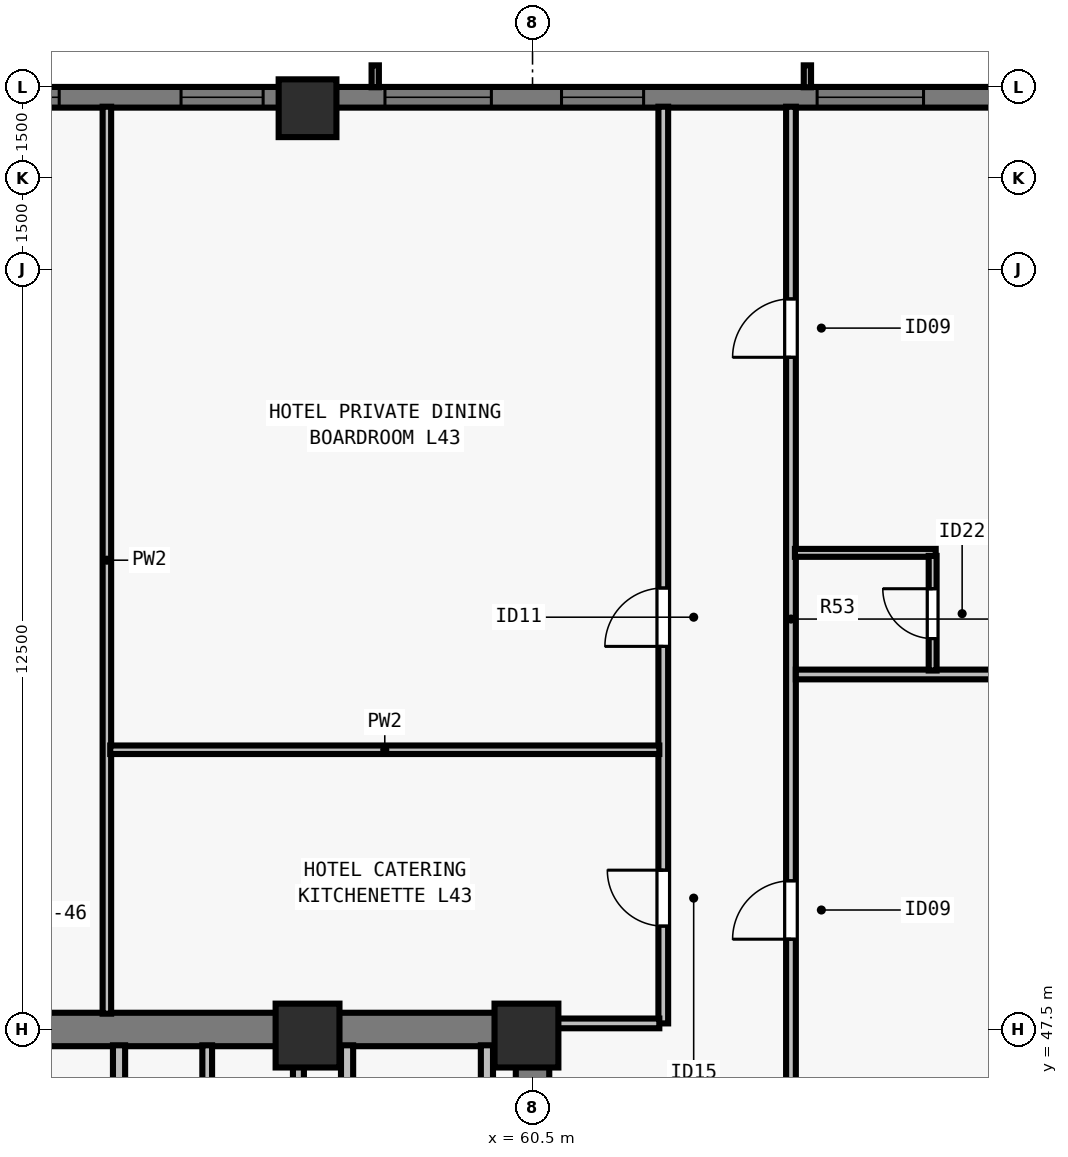
"""IFC4 building model, lengths in metres.
Left out: names, types, materials, properties, quantities, classifications, styles, units other than length and angle.
Written with IfcOpenShell. Run it as: python <this file> out.ifc"""

import sys

from ifc_helpers import new_model, si_unit, direction, frame, frame_2d, origin, origin_2d, place, context, subcontext, project, spatial, rectangle, extrude, element, fill, save


model = new_model("IFC4")
c1 = context("Model", 3, precision=1e-05, world=origin(), true_north=direction((0.0, 1.0)))
c2 = subcontext(c1, "Body", "Model", "MODEL_VIEW")
j1 = project(units=[si_unit("LENGTHUNIT", "METRE"), si_unit("PLANEANGLEUNIT", "RADIAN")], contexts=[c1])
p1 = place(None, origin())
s1 = spatial("IfcSite", under=j1, at=p1, CompositionType="ELEMENT")
p2 = place(p1, origin())
s2 = spatial("IfcBuilding", under=s1, at=p2, CompositionType="ELEMENT")
p3 = place(p2, frame((0.0, 0.0, 158.5)))
s3 = spatial("IfcBuildingStorey", under=s2, at=p3, CompositionType="ELEMENT", Elevation=158.5)
for number, where, z_axis, x_axis in (
    (1, (56.8, 47.4, 0.0), (0.0, 0.0, 1.0), (1.0, 0.0, 0.0)),
    (2, (60.4, 47.4, 0.0), (0.0, 0.0, 1.0), (1.0, 0.0, 0.0)),
):
    element("IfcColumn", number, at=place(p3, frame(where, z_axis=z_axis, x_axis=x_axis)), inside=s3, PredefinedType="COLUMN", context=c2, shape_type="SweptSolid", body=[
        extrude(rectangle(XDim=1.05, YDim=1.05, at=origin_2d()), origin(), (0.0, 0.0, 1.0), 3.5),
    ])
p4 = place(p3, frame((56.8, 62.65, 0.0), z_axis=(0.0, 0.0, 1.0), x_axis=(1.0, 0.0, 0.0)))
e3 = element("IfcColumn", 3, at=p4, inside=s3, PredefinedType="COLUMN", context=c2, shape_type="SweptSolid", body=[
    extrude(rectangle(XDim=0.95, YDim=0.95, at=origin_2d()), origin(), (0.0, 0.0, 1.0), 3.5),
])
p5 = place(p3, frame((32.0, 62.83, 0.0), z_axis=(0.0, 0.0, 1.0), x_axis=(1.0, 0.0, 0.0)))
e4 = element("IfcWall", 4, at=p5, inside=s3, PredefinedType="SOLIDWALL", context=c2, shape_type="SweptSolid", body=[
    extrude(rectangle(XDim=39.682, YDim=0.34, at=frame_2d((19.841, 0.0))), origin(), (0.0, 0.0, 1.0), 3.28),
])
p6 = place(p5, frame((3.902, 0.0, 0.8)))
e5 = element("IfcOpeningElement", 5, at=p6, cuts=e4, PredefinedType="OPENING", context=c2, shape_type="SweptSolid", body=[
    extrude(rectangle(XDim=1.75, YDim=1.66, at=frame_2d((0.875, 0.83))), frame((0.0, 0.18, 0.0), z_axis=(0.0, -1.0, 0.0), x_axis=(1.0, 0.0, 0.0)), (0.0, 0.0, 1.0), 0.36),
])
p7 = place(p5, frame((8.955, 0.0, 0.8)))
e6 = element("IfcOpeningElement", 6, at=p7, cuts=e4, PredefinedType="OPENING", context=c2, shape_type="SweptSolid", body=[
    extrude(rectangle(XDim=1.35, YDim=1.66, at=frame_2d((0.675, 0.83))), frame((0.0, 0.18, 0.0), z_axis=(0.0, -1.0, 0.0), x_axis=(1.0, 0.0, 0.0)), (0.0, 0.0, 1.0), 0.36),
])
p8 = place(p5, frame((11.859, 0.0, 0.8)))
e7 = element("IfcOpeningElement", 7, at=p8, cuts=e4, PredefinedType="OPENING", context=c2, shape_type="SweptSolid", body=[
    extrude(rectangle(XDim=1.75, YDim=1.66, at=frame_2d((0.875, 0.83))), frame((0.0, 0.18, 0.0), z_axis=(0.0, -1.0, 0.0), x_axis=(1.0, 0.0, 0.0)), (0.0, 0.0, 1.0), 0.36),
])
p9 = place(p5, frame((16.062, 0.0, 0.8)))
e8 = element("IfcOpeningElement", 8, at=p9, cuts=e4, PredefinedType="OPENING", context=c2, shape_type="SweptSolid", body=[
    extrude(rectangle(XDim=1.35, YDim=1.66, at=frame_2d((0.675, 0.83))), frame((0.0, 0.18, 0.0), z_axis=(0.0, -1.0, 0.0), x_axis=(1.0, 0.0, 0.0)), (0.0, 0.0, 1.0), 0.36),
])
p10 = place(p5, frame((18.966, 0.0, 0.8)))
e9 = element("IfcOpeningElement", 9, at=p10, cuts=e4, PredefinedType="OPENING", context=c2, shape_type="SweptSolid", body=[
    extrude(rectangle(XDim=1.75, YDim=1.66, at=frame_2d((0.875, 0.83))), frame((0.0, 0.18, 0.0), z_axis=(0.0, -1.0, 0.0), x_axis=(1.0, 0.0, 0.0)), (0.0, 0.0, 1.0), 0.36),
])
p11 = place(p5, frame((22.719, 0.0, 0.8)))
e10 = element("IfcOpeningElement", 10, at=p11, cuts=e4, PredefinedType="OPENING", context=c2, shape_type="SweptSolid", body=[
    extrude(rectangle(XDim=1.35, YDim=1.66, at=frame_2d((0.675, 0.83))), frame((0.0, 0.18, 0.0), z_axis=(0.0, -1.0, 0.0), x_axis=(1.0, 0.0, 0.0)), (0.0, 0.0, 1.0), 0.36),
])
p12 = place(p5, frame((26.073, 0.0, 0.8)))
e11 = element("IfcOpeningElement", 11, at=p12, cuts=e4, PredefinedType="OPENING", context=c2, shape_type="SweptSolid", body=[
    extrude(rectangle(XDim=1.75, YDim=1.66, at=frame_2d((0.875, 0.83))), frame((0.0, 0.18, 0.0), z_axis=(0.0, -1.0, 0.0), x_axis=(1.0, 0.0, 0.0)), (0.0, 0.0, 1.0), 0.36),
])
p13 = place(p5, frame((28.977, 0.0, 0.8)))
e12 = element("IfcOpeningElement", 12, at=p13, cuts=e4, PredefinedType="OPENING", context=c2, shape_type="SweptSolid", body=[
    extrude(rectangle(XDim=1.35, YDim=1.66, at=frame_2d((0.675, 0.83))), frame((0.0, 0.18, 0.0), z_axis=(0.0, -1.0, 0.0), x_axis=(1.0, 0.0, 0.0)), (0.0, 0.0, 1.0), 0.36),
])
p14 = place(p5, frame((33.18, 0.0, 0.8)))
e13 = element("IfcOpeningElement", 13, at=p14, cuts=e4, PredefinedType="OPENING", context=c2, shape_type="SweptSolid", body=[
    extrude(rectangle(XDim=1.75, YDim=1.66, at=frame_2d((0.875, 0.83))), frame((0.0, 0.18, 0.0), z_axis=(0.0, -1.0, 0.0), x_axis=(1.0, 0.0, 0.0)), (0.0, 0.0, 1.0), 0.36),
])
p15 = place(p3, frame((43.225, 47.5, 0.0), z_axis=(0.0, 0.0, 1.0), x_axis=(1.0, 0.0, 0.0)))
e14 = element("IfcWall", 14, at=p15, inside=s3, PredefinedType="SHEAR", context=c2, shape_type="SweptSolid", body=[
    extrude(rectangle(XDim=17.55, YDim=0.55, at=frame_2d((8.775, 0.0))), origin(), (0.0, 0.0, 1.0), 3.28),
])
p16 = place(p3, frame((60.5, 40.8, 0.0), z_axis=(0.0, 0.0, 1.0), x_axis=(0.0, 1.0, 0.0)))
e15 = element("IfcWall", 15, at=p16, inside=s3, PredefinedType="SHEAR", context=c2, shape_type="SweptSolid", body=[
    extrude(rectangle(XDim=6.435, YDim=0.55, at=frame_2d((3.218, 0.0))), origin(), (0.0, 0.0, 1.0), 3.28),
])
p17 = place(p3, frame((53.7, 40.585, 0.0), z_axis=(0.0, 0.0, 1.0), x_axis=(0.0, 1.0, 0.0)))
e16 = element("IfcWall", 16, at=p17, inside=s3, PredefinedType="SOLIDWALL", context=c2, shape_type="SweptSolid", body=[
    extrude(rectangle(XDim=6.655, YDim=0.2, at=frame_2d((3.328, 0.0))), origin(), (0.0, 0.0, 1.0), 3.28),
])
p18 = place(p17, frame((0.195, 0.0, 0.0)))
e17 = element("IfcOpeningElement", 17, at=p18, cuts=e16, PredefinedType="OPENING", context=c2, shape_type="SweptSolid", body=[
    extrude(rectangle(XDim=0.8, YDim=2.08, at=frame_2d((0.4, 1.04))), frame((0.0, 0.11, 0.0), z_axis=(0.0, -1.0, 0.0), x_axis=(1.0, 0.0, 0.0)), (0.0, 0.0, 1.0), 0.22),
])
p19 = place(p17, frame((4.265, 0.0, 0.0)))
e18 = element("IfcOpeningElement", 18, at=p19, cuts=e16, PredefinedType="OPENING", context=c2, shape_type="SweptSolid", body=[
    extrude(rectangle(XDim=0.95, YDim=2.12, at=frame_2d((0.475, 1.06))), frame((0.0, 0.11, 0.0), z_axis=(0.0, -1.0, 0.0), x_axis=(1.0, 0.0, 0.0)), (0.0, 0.0, 1.0), 0.22),
])
for number, where, z_axis, x_axis in (
    (19, (57.45, 43.735, 0.0), (0.0, 0.0, 1.0), (0.0, 1.0, 0.0)),
    (20, (59.75, 43.735, 0.0), (0.0, 0.0, 1.0), (0.0, 1.0, 0.0)),
):
    element("IfcWall", number, at=place(p3, frame(where, z_axis=z_axis, x_axis=x_axis)), inside=s3, PredefinedType="SOLIDWALL", context=c2, shape_type="SweptSolid", body=[
        extrude(rectangle(XDim=3.505, YDim=0.2, at=frame_2d((1.752, 0.0))), origin(), (0.0, 0.0, 1.0), 3.28),
    ])
p20 = place(p3, frame((56.65, 43.735, 0.0), z_axis=(0.0, 0.0, 1.0), x_axis=(0.0, 1.0, 0.0)))
e21 = element("IfcWall", 21, at=p20, inside=s3, PredefinedType="SOLIDWALL", context=c2, shape_type="SweptSolid", body=[
    extrude(rectangle(XDim=3.505, YDim=0.18, at=frame_2d((1.752, 0.0))), origin(), (0.0, 0.0, 1.0), 3.28),
])
p21 = place(p3, frame((55.15, 44.195, 0.0), z_axis=(0.0, 0.0, 1.0), x_axis=(0.0, 1.0, 0.0)))
e22 = element("IfcWall", 22, at=p21, inside=s3, PredefinedType="PARTITIONING", context=c2, shape_type="SweptSolid", body=[
    extrude(rectangle(XDim=3.045, YDim=0.16, at=frame_2d((1.522, 0.0))), origin(), (0.0, 0.0, 1.0), 3.28),
])
p22 = place(p21, frame((1.025, 0.0, 0.0)))
e23 = element("IfcOpeningElement", 23, at=p22, cuts=e22, PredefinedType="OPENING", context=c2, shape_type="SweptSolid", body=[
    extrude(rectangle(XDim=0.8, YDim=2.1, at=frame_2d((0.4, 1.05))), frame((0.0, 0.09, 0.0), z_axis=(0.0, -1.0, 0.0), x_axis=(1.0, 0.0, 0.0)), (0.0, 0.0, 1.0), 0.18),
])
p23 = place(p3, frame((64.75, 15.325, 0.0), z_axis=(0.0, 0.0, 1.0), x_axis=(0.0, 1.0, 0.0)))
e24 = element("IfcWall", 24, at=p23, inside=s3, PredefinedType="PARTITIONING", context=c2, shape_type="SweptSolid", body=[
    extrude(rectangle(XDim=47.35, YDim=0.16, at=frame_2d((23.675, 0.0))), origin(), (0.0, 0.0, 1.0), 2.555),
])
p24 = place(p23, frame((5.494, 0.0, 0.0)))
e25 = element("IfcOpeningElement", 25, at=p24, cuts=e24, PredefinedType="OPENING", context=c2, shape_type="SweptSolid", body=[
    extrude(rectangle(XDim=0.96, YDim=2.15, at=frame_2d((0.48, 1.075))), frame((0.0, 0.09, 0.0), z_axis=(0.0, -1.0, 0.0), x_axis=(1.0, 0.0, 0.0)), (0.0, 0.0, 1.0), 0.18),
])
p25 = place(p23, frame((14.796, 0.0, 0.0)))
e26 = element("IfcOpeningElement", 26, at=p25, cuts=e24, PredefinedType="OPENING", context=c2, shape_type="SweptSolid", body=[
    extrude(rectangle(XDim=0.96, YDim=2.15, at=frame_2d((0.48, 1.075))), frame((0.0, 0.09, 0.0), z_axis=(0.0, -1.0, 0.0), x_axis=(1.0, 0.0, 0.0)), (0.0, 0.0, 1.0), 0.18),
])
p26 = place(p23, frame((24.228, 0.0, 0.0)))
e27 = element("IfcOpeningElement", 27, at=p26, cuts=e24, PredefinedType="OPENING", context=c2, shape_type="SweptSolid", body=[
    extrude(rectangle(XDim=0.96, YDim=2.15, at=frame_2d((0.48, 1.075))), frame((0.0, 0.09, 0.0), z_axis=(0.0, -1.0, 0.0), x_axis=(1.0, 0.0, 0.0)), (0.0, 0.0, 1.0), 0.18),
])
p27 = place(p23, frame((33.66, 0.0, 0.0)))
e28 = element("IfcOpeningElement", 28, at=p27, cuts=e24, PredefinedType="OPENING", context=c2, shape_type="SweptSolid", body=[
    extrude(rectangle(XDim=0.96, YDim=2.15, at=frame_2d((0.48, 1.075))), frame((0.0, 0.09, 0.0), z_axis=(0.0, -1.0, 0.0), x_axis=(1.0, 0.0, 0.0)), (0.0, 0.0, 1.0), 0.18),
])
p28 = place(p23, frame((43.229, 0.0, 0.0)))
e29 = element("IfcOpeningElement", 29, at=p28, cuts=e24, PredefinedType="OPENING", context=c2, shape_type="SweptSolid", body=[
    extrude(rectangle(XDim=0.96, YDim=2.15, at=frame_2d((0.48, 1.075))), frame((0.0, 0.09, 0.0), z_axis=(0.0, -1.0, 0.0), x_axis=(1.0, 0.0, 0.0)), (0.0, 0.0, 1.0), 0.18),
])
p29 = place(p3, frame((62.65, 47.6, 0.0), z_axis=(0.0, 0.0, 1.0), x_axis=(0.0, 1.0, 0.0)))
e30 = element("IfcWall", 30, at=p29, inside=s3, PredefinedType="PARTITIONING", context=c2, shape_type="SweptSolid", body=[
    extrude(rectangle(XDim=15.075, YDim=0.16, at=frame_2d((7.538, 0.0))), origin(), (0.0, 0.0, 1.0), 2.555),
])
p30 = place(p29, frame((1.6, 0.0, 0.0)))
e31 = element("IfcOpeningElement", 31, at=p30, cuts=e30, PredefinedType="OPENING", context=c2, shape_type="SweptSolid", body=[
    extrude(rectangle(XDim=0.92, YDim=2.12, at=frame_2d((0.46, 1.06))), frame((0.0, 0.09, 0.0), z_axis=(0.0, -1.0, 0.0), x_axis=(1.0, 0.0, 0.0)), (0.0, 0.0, 1.0), 0.18),
])
p31 = place(p29, frame((6.2, 0.0, 0.0)))
e32 = element("IfcOpeningElement", 32, at=p31, cuts=e30, PredefinedType="OPENING", context=c2, shape_type="SweptSolid", body=[
    extrude(rectangle(XDim=0.96, YDim=2.12, at=frame_2d((0.48, 1.06))), frame((0.0, 0.09, 0.0), z_axis=(0.0, -1.0, 0.0), x_axis=(1.0, 0.0, 0.0)), (0.0, 0.0, 1.0), 0.18),
])
p32 = place(p3, frame((60.765, 47.6, 0.0), z_axis=(0.0, 0.0, 1.0), x_axis=(1.0, 0.0, 0.0)))
e33 = element("IfcWall", 33, at=p32, inside=s3, PredefinedType="PARTITIONING", context=c2, shape_type="SweptSolid", body=[
    extrude(rectangle(XDim=1.82, YDim=0.16, at=frame_2d((0.91, 0.0))), origin(), (0.0, 0.0, 1.0), 3.28),
])
p33 = place(p3, frame((53.5, 47.76, 0.0), z_axis=(0.0, 0.0, 1.0), x_axis=(0.0, 1.0, 0.0)))
e34 = element("IfcWall", 34, at=p33, inside=s3, PredefinedType="PARTITIONING", context=c2, shape_type="SweptSolid", body=[
    extrude(rectangle(XDim=14.915, YDim=0.14, at=frame_2d((7.458, 0.0))), origin(), (0.0, 0.0, 1.0), 2.896),
])
p34 = place(p3, frame((53.555, 52.1, 0.0), z_axis=(0.0, 0.0, 1.0), x_axis=(1.0, 0.0, 0.0)))
e35 = element("IfcWall", 35, at=p34, inside=s3, PredefinedType="PARTITIONING", context=c2, shape_type="SweptSolid", body=[
    extrude(rectangle(XDim=9.03, YDim=0.14, at=frame_2d((4.515, 0.0))), origin(), (0.0, 0.0, 1.0), 3.28),
])
p35 = place(p3, frame((64.83, 53.338, 0.0), z_axis=(0.0, 0.0, 1.0), x_axis=(1.0, 0.0, 0.0)))
e36 = element("IfcWall", 36, at=p35, inside=s3, PredefinedType="PARTITIONING", context=c2, shape_type="SweptSolid", body=[
    extrude(rectangle(XDim=10.845, YDim=0.16, at=frame_2d((5.422, 0.0))), origin(), (0.0, 0.0, 1.0), 2.896),
])
p36 = place(p3, frame((64.815, 55.338, 0.0), z_axis=(0.0, 0.0, 1.0), x_axis=(1.0, 0.0, 0.0)))
e37 = element("IfcWall", 37, at=p36, inside=s3, PredefinedType="PLUMBINGWALL", context=c2, shape_type="SweptSolid", body=[
    extrude(rectangle(XDim=2.315, YDim=0.13, at=frame_2d((1.157, 0.0))), origin(), (0.0, 0.0, 1.0), 3.28),
])
p37 = place(p3, frame((67.08, 53.403, 0.0), z_axis=(0.0, 0.0, 1.0), x_axis=(0.0, 1.0, 0.0)))
e38 = element("IfcWall", 38, at=p37, inside=s3, PredefinedType="PLUMBINGWALL", context=c2, shape_type="SweptSolid", body=[
    extrude(rectangle(XDim=1.885, YDim=0.13, at=frame_2d((0.942, 0.0))), origin(), (0.0, 0.0, 1.0), 3.28),
])
p38 = place(p37, frame((0.525, 0.0, 0.0)))
e39 = element("IfcOpeningElement", 39, at=p38, cuts=e38, PredefinedType="OPENING", context=c2, shape_type="SweptSolid", body=[
    extrude(rectangle(XDim=0.82, YDim=2.1, at=frame_2d((0.41, 1.05))), frame((0.0, 0.075, 0.0), z_axis=(0.0, -1.0, 0.0), x_axis=(1.0, 0.0, 0.0)), (0.0, 0.0, 1.0), 0.15),
])
p39 = place(p10, origin())
e40 = element("IfcWindow", 40, at=p39, inside=s3, PartitioningType="SINGLE_PANEL", PredefinedType="WINDOW", context=c2, shape_type="SweptSolid", body=[
    extrude(rectangle(XDim=1.75, YDim=1.66, at=frame_2d((0.875, 0.83))), frame((0.0, -0.05, 0.0), z_axis=(0.0, -1.0, 0.0), x_axis=(1.0, 0.0, 0.0)), (0.0, 0.0, 1.0), 0.06),
])
fill(e9, e40)
p40 = place(p11, origin())
e41 = element("IfcWindow", 41, at=p40, inside=s3, PartitioningType="SINGLE_PANEL", PredefinedType="WINDOW", context=c2, shape_type="SweptSolid", body=[
    extrude(rectangle(XDim=1.35, YDim=1.66, at=frame_2d((0.675, 0.83))), frame((0.0, -0.05, 0.0), z_axis=(0.0, -1.0, 0.0), x_axis=(1.0, 0.0, 0.0)), (0.0, 0.0, 1.0), 0.06),
])
fill(e10, e41)
p41 = place(p12, origin())
e42 = element("IfcWindow", 42, at=p41, inside=s3, PartitioningType="SINGLE_PANEL", PredefinedType="WINDOW", context=c2, shape_type="SweptSolid", body=[
    extrude(rectangle(XDim=1.75, YDim=1.66, at=frame_2d((0.875, 0.83))), frame((0.0, -0.05, 0.0), z_axis=(0.0, -1.0, 0.0), x_axis=(1.0, 0.0, 0.0)), (0.0, 0.0, 1.0), 0.06),
])
fill(e11, e42)
p42 = place(p13, origin())
e43 = element("IfcWindow", 43, at=p42, inside=s3, PartitioningType="SINGLE_PANEL", PredefinedType="WINDOW", context=c2, shape_type="SweptSolid", body=[
    extrude(rectangle(XDim=1.35, YDim=1.66, at=frame_2d((0.675, 0.83))), frame((0.0, -0.05, 0.0), z_axis=(0.0, -1.0, 0.0), x_axis=(1.0, 0.0, 0.0)), (0.0, 0.0, 1.0), 0.06),
])
fill(e12, e43)
p43 = place(p14, origin())
e44 = element("IfcWindow", 44, at=p43, inside=s3, PartitioningType="SINGLE_PANEL", PredefinedType="WINDOW", context=c2, shape_type="SweptSolid", body=[
    extrude(rectangle(XDim=1.75, YDim=1.66, at=frame_2d((0.875, 0.83))), frame((0.0, -0.05, 0.0), z_axis=(0.0, -1.0, 0.0), x_axis=(1.0, 0.0, 0.0)), (0.0, 0.0, 1.0), 0.06),
])
fill(e13, e44)
p44 = place(p30, origin())
e45 = element("IfcDoor", 45, at=p44, inside=s3, OperationType="SINGLE_SWING_RIGHT", PredefinedType="DOOR", context=c2, shape_type="SweptSolid", body=[
    extrude(rectangle(XDim=0.92, YDim=2.12, at=frame_2d((0.46, 1.06))), frame((0.0, 0.025, 0.0), z_axis=(0.0, -1.0, 0.0), x_axis=(1.0, 0.0, 0.0)), (0.0, 0.0, 1.0), 0.05),
])
fill(e31, e45)
p45 = place(p31, origin())
e46 = element("IfcDoor", 46, at=p45, inside=s3, OperationType="SINGLE_SWING_LEFT", PredefinedType="DOOR", context=c2, shape_type="SweptSolid", body=[
    extrude(rectangle(XDim=0.96, YDim=2.12, at=frame_2d((0.48, 1.06))), frame((0.0, 0.025, 0.0), z_axis=(0.0, -1.0, 0.0), x_axis=(1.0, 0.0, 0.0)), (0.0, 0.0, 1.0), 0.05),
])
fill(e32, e46)
p46 = place(p27, origin())
e47 = element("IfcDoor", 47, at=p46, inside=s3, OperationType="SINGLE_SWING_LEFT", PredefinedType="DOOR", context=c2, shape_type="SweptSolid", body=[
    extrude(rectangle(XDim=0.96, YDim=2.15, at=frame_2d((0.48, 1.075))), frame((0.0, 0.025, 0.0), z_axis=(0.0, -1.0, 0.0), x_axis=(1.0, 0.0, 0.0)), (0.0, 0.0, 1.0), 0.05),
])
fill(e28, e47)
p47 = place(p38, origin())
e48 = element("IfcDoor", 48, at=p47, inside=s3, OperationType="SINGLE_SWING_RIGHT", PredefinedType="DOOR", context=c2, shape_type="SweptSolid", body=[
    extrude(rectangle(XDim=0.82, YDim=2.1, at=frame_2d((0.41, 1.05))), frame((0.0, 0.025, 0.0), z_axis=(0.0, -1.0, 0.0), x_axis=(1.0, 0.0, 0.0)), (0.0, 0.0, 1.0), 0.05),
])
fill(e39, e48)
p48 = place(p28, origin())
e49 = element("IfcDoor", 49, at=p48, inside=s3, OperationType="SINGLE_SWING_LEFT", PredefinedType="DOOR", context=c2, shape_type="SweptSolid", body=[
    extrude(rectangle(XDim=0.96, YDim=2.15, at=frame_2d((0.48, 1.075))), frame((0.0, 0.025, 0.0), z_axis=(0.0, -1.0, 0.0), x_axis=(1.0, 0.0, 0.0)), (0.0, 0.0, 1.0), 0.05),
])
fill(e29, e49)
save(model, sys.argv[1])
